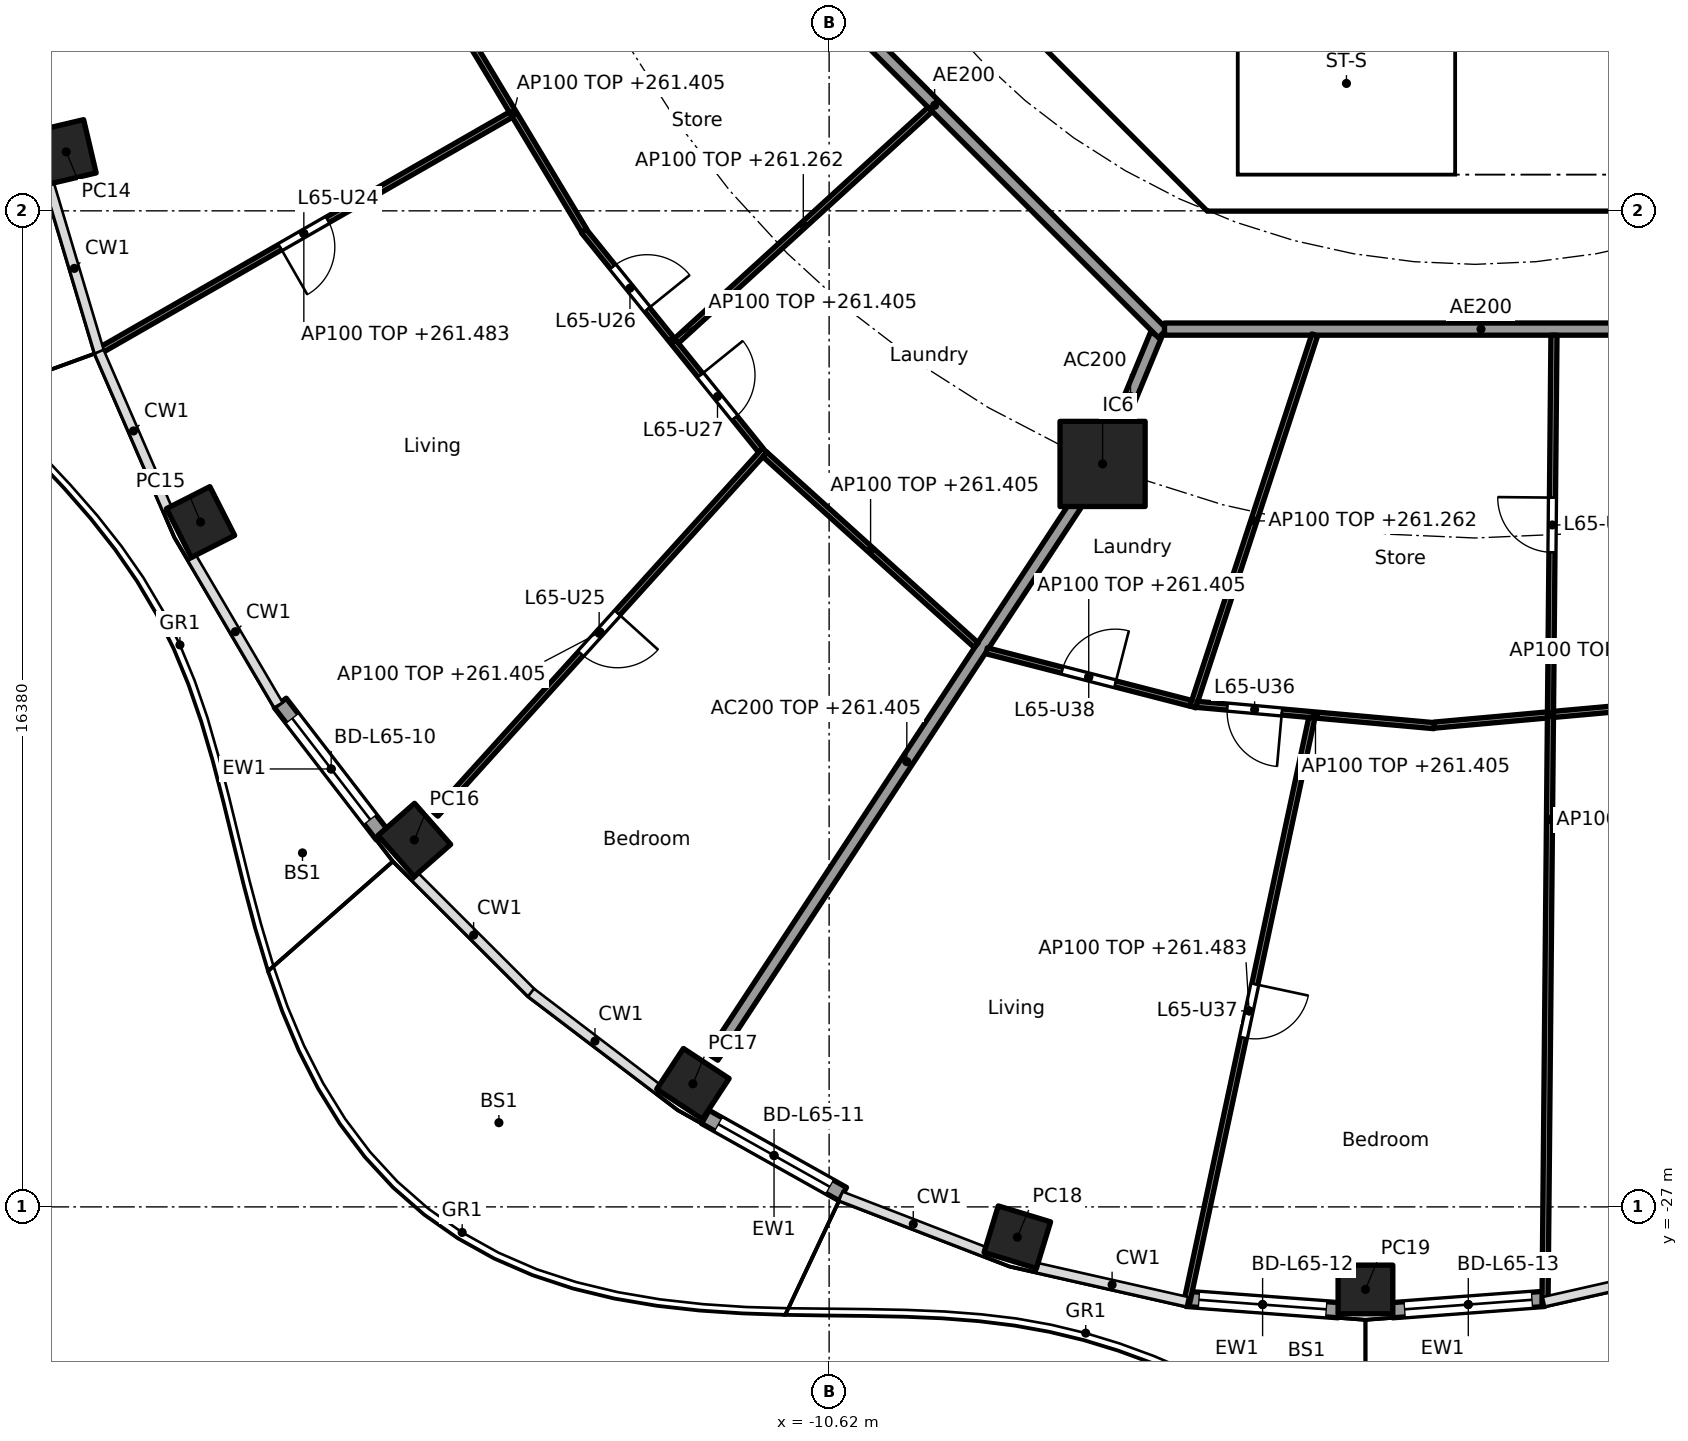
"""IFC4 building model, lengths in metres.
Left out: names, types, materials, properties, quantities, classifications, styles, units other than length and angle.
Written with IfcOpenShell. Run it as: python <this file> out.ifc"""

import sys

from ifc_helpers import new_model, si_unit, direction, frame, frame_2d, origin, origin_2d, place, context, subcontext, project, spatial, polyline, rectangle, hollow_rectangle, outline, extrude, element, fill, save


model = new_model("IFC4")
c1 = context("Model", 3, precision=1e-05, world=origin(), true_north=direction((0.0, 1.0)))
c2 = subcontext(c1, "Body", "Model", "MODEL_VIEW")
j1 = project(units=[si_unit("LENGTHUNIT", "METRE"), si_unit("PLANEANGLEUNIT", "RADIAN")], contexts=[c1])
p1 = place(None, origin())
s1 = spatial("IfcSite", under=j1, at=p1, CompositionType="ELEMENT")
p2 = place(p1, origin())
s2 = spatial("IfcBuilding", under=s1, at=p2, CompositionType="ELEMENT")
p3 = place(p2, frame((0.0, 0.0, 258.5)))
s3 = spatial("IfcBuildingStorey", under=s2, at=p3, CompositionType="ELEMENT", Elevation=258.5)
for number, where, z_axis, x_axis in (
    (1, (-23.166, -9.65, -0.26), (0.0, 0.0, 1.0), (0.229, -0.973, 0.0)),
    (2, (-20.957, -15.738, -0.26), (0.0, 0.0, 1.0), (0.452, -0.892, 0.0)),
    (3, (-17.441, -20.965, -0.26), (0.0, 0.0, 1.0), (0.66, -0.751, 0.0)),
    (4, (-12.86, -24.976, -0.26), (0.0, 0.0, 1.0), (0.836, -0.549, 0.0)),
    (5, (-7.525, -27.498, -0.26), (0.0, 0.0, 1.0), (0.957, -0.292, 0.0)),
    (6, (-1.8, -28.358, -0.26), (0.0, 0.0, 1.0), (1.0, 0.0, 0.0)),
):
    element("IfcColumn", number, at=place(p3, frame(where, z_axis=z_axis, x_axis=x_axis)), inside=s3, PredefinedType="COLUMN", context=c2, shape_type="SweptSolid", body=[
        extrude(hollow_rectangle(XDim=0.9, YDim=0.8, WallThickness=0.028, at=origin_2d()), origin(), (0.0, 0.0, 1.0), 3.96),
    ])
p4 = place(p3, frame((-6.123, -14.782, 0.0), z_axis=(0.0, 0.0, 1.0), x_axis=(1.0, 0.0, 0.0)))
e7 = element("IfcColumn", 7, at=p4, inside=s3, PredefinedType="COLUMN", context=c2, shape_type="SweptSolid", body=[
    extrude(rectangle(XDim=1.4, YDim=1.4, at=origin_2d()), origin(), (0.0, 0.0, 1.0), 3.7),
])
p5 = place(p3, frame((-17.97, -20.886, 0.0), z_axis=(0.0, 0.0, 1.0), x_axis=(-0.610432336622, 0.792068407656, 0.0)))
e8 = element("IfcWall", 8, at=p5, inside=s3, PredefinedType="SOLIDWALL", context=c2, shape_type="SweptSolid", body=[
    extrude(rectangle(XDim=2.746, YDim=0.25, at=frame_2d((1.373, 0.0))), origin(), (0.0, 0.0, 1.0), 3.44),
])
p6 = place(p5, frame((0.323, 0.0, 0.0)))
e9 = element("IfcOpeningElement", 9, at=p6, cuts=e8, PredefinedType="OPENING", context=c2, shape_type="SweptSolid", body=[
    extrude(rectangle(XDim=2.1, YDim=2.4, at=frame_2d((1.05, 1.2))), frame((0.0, 0.135, 0.0), z_axis=(0.0, -1.0, 0.0), x_axis=(1.0, 0.0, 0.0)), (0.0, 0.0, 1.0), 0.27),
])
p7 = place(p3, frame((-10.395, -26.789, 0.0), z_axis=(0.0, 0.0, 1.0), x_axis=(-0.872115604046, 0.489299880625, 0.0)))
e10 = element("IfcWall", 10, at=p7, inside=s3, PredefinedType="SOLIDWALL", context=c2, shape_type="SweptSolid", body=[
    extrude(rectangle(XDim=2.593, YDim=0.25, at=frame_2d((1.296, 0.0))), origin(), (0.0, 0.0, 1.0), 3.44),
])
p8 = place(p7, frame((0.247, 0.0, 0.0)))
e11 = element("IfcOpeningElement", 11, at=p8, cuts=e10, PredefinedType="OPENING", context=c2, shape_type="SweptSolid", body=[
    extrude(rectangle(XDim=2.1, YDim=2.4, at=frame_2d((1.05, 1.2))), frame((0.0, 0.135, 0.0), z_axis=(0.0, -1.0, 0.0), x_axis=(1.0, 0.0, 0.0)), (0.0, 0.0, 1.0), 0.27),
])
p9 = place(p3, frame((-2.24, -28.699, 0.0), z_axis=(0.0, 0.0, 1.0), x_axis=(-0.997236355794, 0.074294351616, 0.0)))
e12 = element("IfcWall", 12, at=p9, inside=s3, PredefinedType="SOLIDWALL", context=c2, shape_type="SweptSolid", body=[
    extrude(rectangle(XDim=2.51, YDim=0.25, at=frame_2d((1.255, 0.0))), origin(), (0.0, 0.0, 1.0), 3.44),
])
p10 = place(p9, frame((0.205, 0.0, 0.0)))
e13 = element("IfcOpeningElement", 13, at=p10, cuts=e12, PredefinedType="OPENING", context=c2, shape_type="SweptSolid", body=[
    extrude(rectangle(XDim=2.1, YDim=2.4, at=frame_2d((1.05, 1.2))), frame((0.0, 0.135, 0.0), z_axis=(0.0, -1.0, 0.0), x_axis=(1.0, 0.0, 0.0)), (0.0, 0.0, 1.0), 0.27),
])
p11 = place(p3, frame((1.143, -28.513, 0.0), z_axis=(0.0, 0.0, 1.0), x_axis=(-0.997236892469, -0.074287147606, 0.0)))
e14 = element("IfcWall", 14, at=p11, inside=s3, PredefinedType="SOLIDWALL", context=c2, shape_type="SweptSolid", body=[
    extrude(rectangle(XDim=2.511, YDim=0.25, at=frame_2d((1.255, 0.0))), origin(), (0.0, 0.0, 1.0), 3.44),
])
p12 = place(p11, frame((0.205, 0.0, 0.0)))
e15 = element("IfcOpeningElement", 15, at=p12, cuts=e14, PredefinedType="OPENING", context=c2, shape_type="SweptSolid", body=[
    extrude(rectangle(XDim=2.1, YDim=2.4, at=frame_2d((1.05, 1.2))), frame((0.0, 0.135, 0.0), z_axis=(0.0, -1.0, 0.0), x_axis=(1.0, 0.0, 0.0)), (0.0, 0.0, 1.0), 0.27),
])
p13 = place(p3, frame((-9.988, -4.613, 0.0), z_axis=(0.0, 0.0, 1.0), x_axis=(0.707106781187, -0.707106781187, 0.0)))
e16 = element("IfcWall", 16, at=p13, inside=s3, PredefinedType="SHEAR", context=c2, shape_type="SweptSolid", body=[
    extrude(rectangle(XDim=7.602, YDim=0.6, at=frame_2d((3.801, 0.0))), origin(), (0.0, 0.0, 1.0), 3.44),
])
p14 = place(p13, frame((6.151, 0.0, 0.0)))
e17 = element("IfcOpeningElement", 17, at=p14, cuts=e16, PredefinedType="OPENING", context=c2, shape_type="SweptSolid", body=[
    extrude(rectangle(XDim=1.1, YDim=2.1, at=frame_2d((0.55, 1.05))), frame((0.0, 0.31, 0.0), z_axis=(0.0, -1.0, 0.0), x_axis=(1.0, 0.0, 0.0)), (0.0, 0.0, 1.0), 0.62),
])
p15 = place(p3, origin())
e18 = element("IfcWall", 18, at=p15, inside=s3, PredefinedType="SHEAR", context=c2, shape_type="SweptSolid", body=[
    extrude(outline(polyline([(-4.152, -10.025), (4.152, -10.025), (4.401, -9.776), (4.825, -10.2), (4.401, -10.625), (-4.401, -10.625), (-4.825, -10.2), (-4.401, -9.776), (-4.152, -10.025)])), origin(), (0.0, 0.0, 1.0), 3.44),
])
p16 = place(p3, origin())
e19 = element("IfcWall", 19, at=p16, inside=s3, PredefinedType="SOLIDWALL", context=c2, shape_type="SweptSolid", body=[
    extrude(outline(polyline([(-3.9, -10.025), (-4.1, -10.025), (-4.1, -7.025), (-3.9, -7.025), (-3.9, -10.025)])), origin(), (0.0, 0.0, 1.0), 3.44),
])
p17 = place(p3, frame((-5.243, -12.657, 0.0), z_axis=(0.0, 0.0, 1.0), x_axis=(-0.382770106157, -0.923843626288, 0.0)))
e20 = element("IfcWall", 20, at=p17, inside=s3, PredefinedType="PARTITIONING", context=c2, shape_type="SweptSolid", body=[
    extrude(rectangle(XDim=2.199, YDim=0.2, at=frame_2d((1.1, 0.0))), origin(), (0.0, 0.0, 1.0), 3.44),
])
p18 = place(p3, frame((-6.151, -14.824, 0.0), z_axis=(0.0, 0.0, 1.0), x_axis=(-0.549345577828, -0.835595258556, 0.0)))
e21 = element("IfcWall", 21, at=p18, inside=s3, PredefinedType="PARTITIONING", context=c2, shape_type="SweptSolid", body=[
    extrude(rectangle(XDim=11.62, YDim=0.2, at=frame_2d((5.81, 0.0))), origin(), (0.0, 0.0, 1.0), 2.905),
])
p19 = place(p3, frame((-12.635, -5.134, 0.0), z_axis=(0.0, 0.0, 1.0), x_axis=(0.707106781187, -0.707106781187, 0.0)))
e22 = element("IfcWall", 22, at=p19, inside=s3, PredefinedType="PARTITIONING", context=c2, shape_type="SweptSolid", body=[
    extrude(rectangle(XDim=10.609, YDim=0.2, at=frame_2d((5.305, 0.0))), origin(), (0.0, 0.0, 1.0), 3.44),
])
p20 = place(p3, frame((-5.104, -12.565, 0.0), z_axis=(0.0, 0.0, 1.0), x_axis=(1.0, 0.0, 0.0)))
e23 = element("IfcWall", 23, at=p20, inside=s3, PredefinedType="PARTITIONING", context=c2, shape_type="SweptSolid", body=[
    extrude(rectangle(XDim=10.409, YDim=0.2, at=frame_2d((5.205, 0.0))), origin(), (0.0, 0.0, 1.0), 3.44),
])
p21 = place(p3, frame((-16.972, -7.08, 0.0), z_axis=(0.0, 0.0, 1.0), x_axis=(0.514989049311, -0.857196756346, 0.0)))
e24 = element("IfcWall", 24, at=p21, inside=s3, PredefinedType="PARTITIONING", context=c2, shape_type="SweptSolid", body=[
    extrude(rectangle(XDim=4.512, YDim=0.1, at=frame_2d((2.256, 0.0))), origin(), (0.0, 0.0, 1.0), 2.905),
])
p22 = place(p3, frame((-15.854, -9.038, 0.0), z_axis=(0.0, 0.0, 1.0), x_axis=(-0.867229230904, -0.497909089157, 0.0)))
e25 = element("IfcWall", 25, at=p22, inside=s3, PredefinedType="PARTITIONING", context=c2, shape_type="SweptSolid", body=[
    extrude(rectangle(XDim=7.853, YDim=0.1, at=frame_2d((3.926, 0.0))), origin(), (0.0, 0.0, 1.0), 2.983),
])
p23 = place(p22, frame((3.476, 0.0, 0.0)))
e26 = element("IfcOpeningElement", 26, at=p23, cuts=e25, PredefinedType="OPENING", context=c2, shape_type="SweptSolid", body=[
    extrude(rectangle(XDim=0.9, YDim=2.1, at=frame_2d((0.45, 1.05))), frame((0.0, 0.06, 0.0), z_axis=(0.0, -1.0, 0.0), x_axis=(1.0, 0.0, 0.0)), (0.0, 0.0, 1.0), 0.12),
])
p24 = place(p3, frame((-14.654, -10.951, 0.0), z_axis=(0.0, 0.0, 1.0), x_axis=(0.62815308134, -0.778089780426, 0.0)))
e27 = element("IfcWall", 27, at=p24, inside=s3, PredefinedType="PARTITIONING", context=c2, shape_type="SweptSolid", body=[
    extrude(rectangle(XDim=4.633, YDim=0.1, at=frame_2d((2.316, 0.0))), origin(), (0.0, 0.0, 1.0), 2.905),
])
p25 = place(p24, frame((0.758, 0.0, 0.0)))
e28 = element("IfcOpeningElement", 28, at=p25, cuts=e27, PredefinedType="OPENING", context=c2, shape_type="SweptSolid", body=[
    extrude(rectangle(XDim=0.9, YDim=2.1, at=frame_2d((0.45, 1.05))), frame((0.0, 0.06, 0.0), z_axis=(0.0, -1.0, 0.0), x_axis=(1.0, 0.0, 0.0)), (0.0, 0.0, 1.0), 0.12),
])
p26 = place(p24, frame((3.049, 0.0, 0.0)))
e29 = element("IfcOpeningElement", 29, at=p26, cuts=e27, PredefinedType="OPENING", context=c2, shape_type="SweptSolid", body=[
    extrude(rectangle(XDim=0.9, YDim=2.1, at=frame_2d((0.45, 1.05))), frame((0.0, 0.06, 0.0), z_axis=(0.0, -1.0, 0.0), x_axis=(1.0, 0.0, 0.0)), (0.0, 0.0, 1.0), 0.12),
])
p27 = place(p3, frame((-8.958, -8.952, 0.0), z_axis=(0.0, 0.0, 1.0), x_axis=(-0.73876526954, -0.673962815385, 0.0)))
e30 = element("IfcWall", 30, at=p27, inside=s3, PredefinedType="PARTITIONING", context=c2, shape_type="SweptSolid", body=[
    extrude(rectangle(XDim=5.647, YDim=0.1, at=frame_2d((2.824, 0.0))), origin(), (0.0, 0.0, 1.0), 2.762),
])
p28 = place(p3, frame((-11.679, -14.557, 0.0), z_axis=(0.0, 0.0, 1.0), x_axis=(-0.670800011545, -0.741638284146, 0.0)))
e31 = element("IfcWall", 31, at=p28, inside=s3, PredefinedType="PARTITIONING", context=c2, shape_type="SweptSolid", body=[
    extrude(rectangle(XDim=8.068, YDim=0.1, at=frame_2d((4.034, 0.0))), origin(), (0.0, 0.0, 1.0), 2.905),
])
p29 = place(p28, frame((3.609, 0.0, 0.0)))
e32 = element("IfcOpeningElement", 32, at=p29, cuts=e31, PredefinedType="OPENING", context=c2, shape_type="SweptSolid", body=[
    extrude(rectangle(XDim=0.9, YDim=2.1, at=frame_2d((0.45, 1.05))), frame((0.0, 0.06, 0.0), z_axis=(0.0, -1.0, 0.0), x_axis=(1.0, 0.0, 0.0)), (0.0, 0.0, 1.0), 0.12),
])
p30 = place(p3, frame((-11.676, -14.628, 0.0), z_axis=(0.0, 0.0, 1.0), x_axis=(0.74245829867, -0.669892285921, 0.0)))
e33 = element("IfcWall", 33, at=p30, inside=s3, PredefinedType="PARTITIONING", context=c2, shape_type="SweptSolid", body=[
    extrude(rectangle(XDim=4.68, YDim=0.1, at=frame_2d((2.34, 0.0))), origin(), (0.0, 0.0, 1.0), 2.905),
])
p31 = place(p3, frame((-8.03, -17.854, 0.0), z_axis=(0.0, 0.0, 1.0), x_axis=(0.968441967324, -0.249239154077, 0.0)))
e34 = element("IfcWall", 34, at=p31, inside=s3, PredefinedType="PARTITIONING", context=c2, shape_type="SweptSolid", body=[
    extrude(rectangle(XDim=3.468, YDim=0.1, at=frame_2d((1.734, 0.0))), origin(), (0.0, 0.0, 1.0), 2.905),
])
p32 = place(p31, frame((1.284, 0.0, 0.0)))
e35 = element("IfcOpeningElement", 35, at=p32, cuts=e34, PredefinedType="OPENING", context=c2, shape_type="SweptSolid", body=[
    extrude(rectangle(XDim=0.9, YDim=2.1, at=frame_2d((0.45, 1.05))), frame((0.0, 0.06, 0.0), z_axis=(0.0, -1.0, 0.0), x_axis=(1.0, 0.0, 0.0)), (0.0, 0.0, 1.0), 0.12),
])
p33 = place(p3, frame((-2.633, -12.66, 0.0), z_axis=(0.0, 0.0, 1.0), x_axis=(-0.311435053715, -0.950267439891, 0.0)))
e36 = element("IfcWall", 36, at=p33, inside=s3, PredefinedType="PARTITIONING", context=c2, shape_type="SweptSolid", body=[
    extrude(rectangle(XDim=6.439, YDim=0.1, at=frame_2d((3.22, 0.0))), origin(), (0.0, 0.0, 1.0), 2.762),
])
p34 = place(p3, frame((-4.573, -18.736, 0.0), z_axis=(0.0, 0.0, 1.0), x_axis=(0.995984610732, -0.089524606594, 0.0)))
e37 = element("IfcWall", 37, at=p34, inside=s3, PredefinedType="PARTITIONING", context=c2, shape_type="SweptSolid", body=[
    extrude(rectangle(XDim=3.919, YDim=0.1, at=frame_2d((1.959, 0.0))), origin(), (0.0, 0.0, 1.0), 2.905),
])
p35 = place(p34, frame((0.505, 0.0, 0.0)))
e38 = element("IfcOpeningElement", 38, at=p35, cuts=e37, PredefinedType="OPENING", context=c2, shape_type="SweptSolid", body=[
    extrude(rectangle(XDim=0.9, YDim=2.1, at=frame_2d((0.45, 1.05))), frame((0.0, 0.06, 0.0), z_axis=(0.0, -1.0, 0.0), x_axis=(1.0, 0.0, 0.0)), (0.0, 0.0, 1.0), 0.12),
])
p36 = place(p3, frame((-2.682, -18.955, 0.0), z_axis=(0.0, 0.0, 1.0), x_axis=(-0.209106370979, -0.977892900892, 0.0)))
e39 = element("IfcWall", 39, at=p36, inside=s3, PredefinedType="PARTITIONING", context=c2, shape_type="SweptSolid", body=[
    extrude(rectangle(XDim=9.861, YDim=0.1, at=frame_2d((4.931, 0.0))), origin(), (0.0, 0.0, 1.0), 2.983),
])
p37 = place(p36, frame((4.48, 0.0, 0.0)))
e40 = element("IfcOpeningElement", 40, at=p37, cuts=e39, PredefinedType="OPENING", context=c2, shape_type="SweptSolid", body=[
    extrude(rectangle(XDim=0.9, YDim=2.1, at=frame_2d((0.45, 1.05))), frame((0.0, 0.06, 0.0), z_axis=(0.0, -1.0, 0.0), x_axis=(1.0, 0.0, 0.0)), (0.0, 0.0, 1.0), 0.12),
])
p38 = place(p3, frame((-0.67, -19.077, 0.0), z_axis=(0.0, 0.0, 1.0), x_axis=(0.995986472869, 0.089503887414, 0.0)))
e41 = element("IfcWall", 41, at=p38, inside=s3, PredefinedType="PARTITIONING", context=c2, shape_type="SweptSolid", body=[
    extrude(rectangle(XDim=3.819, YDim=0.1, at=frame_2d((1.909, 0.0))), origin(), (0.0, 0.0, 1.0), 2.905),
])
p39 = place(p3, frame((1.3, -12.665, 0.0), z_axis=(0.0, 0.0, 1.0), x_axis=(-0.009254890166, -0.999957172587, 0.0)))
e42 = element("IfcWall", 42, at=p39, inside=s3, PredefinedType="PARTITIONING", context=c2, shape_type="SweptSolid", body=[
    extrude(rectangle(XDim=15.933, YDim=0.1, at=frame_2d((7.967, 0.0))), origin(), (0.0, 0.0, 1.0), 2.762),
])
p40 = place(p39, frame((2.671, 0.0, 0.0)))
e43 = element("IfcOpeningElement", 43, at=p40, cuts=e42, PredefinedType="OPENING", context=c2, shape_type="SweptSolid", body=[
    extrude(rectangle(XDim=0.9, YDim=2.1, at=frame_2d((0.45, 1.05))), frame((0.0, 0.06, 0.0), z_axis=(0.0, -1.0, 0.0), x_axis=(1.0, 0.0, 0.0)), (0.0, 0.0, 1.0), 0.12),
])
p41 = place(p6, origin())
e44 = element("IfcDoor", 44, at=p41, inside=s3, OperationType="SLIDING_TO_LEFT", PredefinedType="DOOR", context=c2, shape_type="SweptSolid", body=[
    extrude(rectangle(XDim=2.1, YDim=2.4, at=frame_2d((1.05, 1.2))), frame((0.0, 0.025, 0.0), z_axis=(0.0, -1.0, 0.0), x_axis=(1.0, 0.0, 0.0)), (0.0, 0.0, 1.0), 0.05),
])
fill(e9, e44)
p42 = place(p8, origin())
e45 = element("IfcDoor", 45, at=p42, inside=s3, OperationType="SLIDING_TO_LEFT", PredefinedType="DOOR", context=c2, shape_type="SweptSolid", body=[
    extrude(rectangle(XDim=2.1, YDim=2.4, at=frame_2d((1.05, 1.2))), frame((0.0, 0.025, 0.0), z_axis=(0.0, -1.0, 0.0), x_axis=(1.0, 0.0, 0.0)), (0.0, 0.0, 1.0), 0.05),
])
fill(e11, e45)
p43 = place(p10, origin())
e46 = element("IfcDoor", 46, at=p43, inside=s3, OperationType="SLIDING_TO_LEFT", PredefinedType="DOOR", context=c2, shape_type="SweptSolid", body=[
    extrude(rectangle(XDim=2.1, YDim=2.4, at=frame_2d((1.05, 1.2))), frame((0.0, 0.025, 0.0), z_axis=(0.0, -1.0, 0.0), x_axis=(1.0, 0.0, 0.0)), (0.0, 0.0, 1.0), 0.05),
])
fill(e13, e46)
p44 = place(p12, origin())
e47 = element("IfcDoor", 47, at=p44, inside=s3, OperationType="SLIDING_TO_LEFT", PredefinedType="DOOR", context=c2, shape_type="SweptSolid", body=[
    extrude(rectangle(XDim=2.1, YDim=2.4, at=frame_2d((1.05, 1.2))), frame((0.0, 0.025, 0.0), z_axis=(0.0, -1.0, 0.0), x_axis=(1.0, 0.0, 0.0)), (0.0, 0.0, 1.0), 0.05),
])
fill(e15, e47)
p45 = place(p14, origin())
e48 = element("IfcDoor", 48, at=p45, inside=s3, OperationType="SINGLE_SWING_LEFT", PredefinedType="DOOR", context=c2, shape_type="SweptSolid", body=[
    extrude(rectangle(XDim=1.1, YDim=2.1, at=frame_2d((0.55, 1.05))), frame((0.0, 0.025, 0.0), z_axis=(0.0, -1.0, 0.0), x_axis=(1.0, 0.0, 0.0)), (0.0, 0.0, 1.0), 0.05),
])
fill(e17, e48)
p46 = place(p23, origin())
e49 = element("IfcDoor", 49, at=p46, inside=s3, OperationType="SINGLE_SWING_RIGHT", PredefinedType="DOOR", context=c2, shape_type="SweptSolid", body=[
    extrude(rectangle(XDim=0.9, YDim=2.1, at=frame_2d((0.45, 1.05))), frame((0.0, 0.025, 0.0), z_axis=(0.0, -1.0, 0.0), x_axis=(1.0, 0.0, 0.0)), (0.0, 0.0, 1.0), 0.05),
])
fill(e26, e49)
p47 = place(p29, origin())
e50 = element("IfcDoor", 50, at=p47, inside=s3, OperationType="SINGLE_SWING_LEFT", PredefinedType="DOOR", context=c2, shape_type="SweptSolid", body=[
    extrude(rectangle(XDim=0.9, YDim=2.1, at=frame_2d((0.45, 1.05))), frame((0.0, 0.025, 0.0), z_axis=(0.0, -1.0, 0.0), x_axis=(1.0, 0.0, 0.0)), (0.0, 0.0, 1.0), 0.05),
])
fill(e32, e50)
p48 = place(p25, origin())
e51 = element("IfcDoor", 51, at=p48, inside=s3, OperationType="SINGLE_SWING_RIGHT", PredefinedType="DOOR", context=c2, shape_type="SweptSolid", body=[
    extrude(rectangle(XDim=0.9, YDim=2.1, at=frame_2d((0.45, 1.05))), frame((0.0, 0.025, 0.0), z_axis=(0.0, -1.0, 0.0), x_axis=(1.0, 0.0, 0.0)), (0.0, 0.0, 1.0), 0.05),
])
fill(e28, e51)
p49 = place(p26, origin())
e52 = element("IfcDoor", 52, at=p49, inside=s3, OperationType="SINGLE_SWING_LEFT", PredefinedType="DOOR", context=c2, shape_type="SweptSolid", body=[
    extrude(rectangle(XDim=0.9, YDim=2.1, at=frame_2d((0.45, 1.05))), frame((0.0, 0.025, 0.0), z_axis=(0.0, -1.0, 0.0), x_axis=(1.0, 0.0, 0.0)), (0.0, 0.0, 1.0), 0.05),
])
fill(e29, e52)
p50 = place(p40, frame((0.9, 0.0, 0.0), x_axis=(-1.0, 0.0, 0.0)))
e53 = element("IfcDoor", 53, at=p50, inside=s3, OperationType="SINGLE_SWING_RIGHT", PredefinedType="DOOR", context=c2, shape_type="SweptSolid", body=[
    extrude(rectangle(XDim=0.9, YDim=2.1, at=frame_2d((0.45, 1.05))), frame((0.0, 0.025, 0.0), z_axis=(0.0, -1.0, 0.0), x_axis=(1.0, 0.0, 0.0)), (0.0, 0.0, 1.0), 0.05),
])
fill(e43, e53)
p51 = place(p35, frame((0.9, 0.0, 0.0), x_axis=(-1.0, 0.0, 0.0)))
e54 = element("IfcDoor", 54, at=p51, inside=s3, OperationType="SINGLE_SWING_LEFT", PredefinedType="DOOR", context=c2, shape_type="SweptSolid", body=[
    extrude(rectangle(XDim=0.9, YDim=2.1, at=frame_2d((0.45, 1.05))), frame((0.0, 0.025, 0.0), z_axis=(0.0, -1.0, 0.0), x_axis=(1.0, 0.0, 0.0)), (0.0, 0.0, 1.0), 0.05),
])
fill(e38, e54)
p52 = place(p37, origin())
e55 = element("IfcDoor", 55, at=p52, inside=s3, OperationType="SINGLE_SWING_LEFT", PredefinedType="DOOR", context=c2, shape_type="SweptSolid", body=[
    extrude(rectangle(XDim=0.9, YDim=2.1, at=frame_2d((0.45, 1.05))), frame((0.0, 0.025, 0.0), z_axis=(0.0, -1.0, 0.0), x_axis=(1.0, 0.0, 0.0)), (0.0, 0.0, 1.0), 0.05),
])
fill(e40, e55)
p53 = place(p32, origin())
e56 = element("IfcDoor", 56, at=p53, inside=s3, OperationType="SINGLE_SWING_RIGHT", PredefinedType="DOOR", context=c2, shape_type="SweptSolid", body=[
    extrude(rectangle(XDim=0.9, YDim=2.1, at=frame_2d((0.45, 1.05))), frame((0.0, 0.025, 0.0), z_axis=(0.0, -1.0, 0.0), x_axis=(1.0, 0.0, 0.0)), (0.0, 0.0, 1.0), 0.05),
])
fill(e35, e56)
save(model, sys.argv[1])
